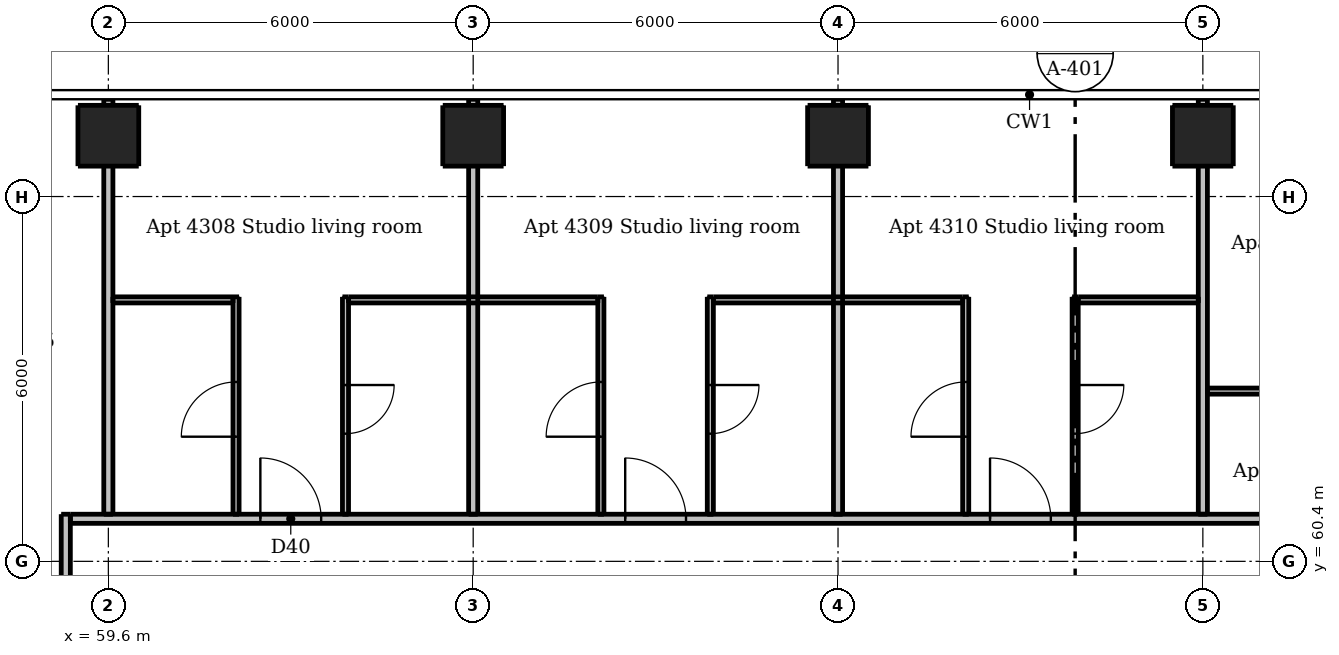
"""IFC4 building model, lengths in metres.
Left out: names, types, materials, properties, quantities, classifications, styles, units other than length and angle.
Written with IfcOpenShell. Run it as: python <this file> out.ifc"""

import sys

from ifc_helpers import new_model, si_unit, direction, frame, frame_2d, origin, origin_2d, place, context, subcontext, project, spatial, rectangle, extrude, element, fill, save


model = new_model("IFC4")
c1 = context("Model", 3, precision=1e-05, world=origin(), true_north=direction((0.0, 1.0)))
c2 = subcontext(c1, "Body", "Model", "MODEL_VIEW")
j1 = project(units=[si_unit("LENGTHUNIT", "METRE"), si_unit("PLANEANGLEUNIT", "RADIAN")], contexts=[c1])
p1 = place(None, origin())
s1 = spatial("IfcSite", under=j1, at=p1, CompositionType="ELEMENT")
p2 = place(p1, origin())
s2 = spatial("IfcBuilding", under=s1, at=p2, CompositionType="ELEMENT")
p3 = place(p2, frame((0.0, 0.0, 161.5)))
s3 = spatial("IfcBuildingStorey", under=s2, at=p3, CompositionType="ELEMENT", Elevation=161.5)
for number, where, z_axis, x_axis in (
    (1, (59.6, 67.4, 0.0), (0.0, 0.0, 1.0), (1.0, 0.0, 0.0)),
    (2, (65.6, 67.4, 0.0), (0.0, 0.0, 1.0), (1.0, 0.0, 0.0)),
    (3, (71.6, 67.4, 0.0), (0.0, 0.0, 1.0), (1.0, 0.0, 0.0)),
    (4, (77.6, 67.4, 0.0), (0.0, 0.0, 1.0), (1.0, 0.0, 0.0)),
):
    element("IfcColumn", number, at=place(p3, frame(where, z_axis=z_axis, x_axis=x_axis)), inside=s3, PredefinedType="COLUMN", context=c2, shape_type="SweptSolid", body=[
        extrude(rectangle(XDim=1.0, YDim=1.0, at=origin_2d()), origin(), (0.0, 0.0, 1.0), 3.05),
    ])
p4 = place(p3, frame((61.7, 61.175, 0.0), z_axis=(0.0, 0.0, 1.0), x_axis=(0.0, 1.0, 0.0)))
e5 = element("IfcWall", 5, at=p4, inside=s3, PredefinedType="PARTITIONING", context=c2, shape_type="SweptSolid", body=[
    extrude(rectangle(XDim=3.575, YDim=0.1, at=frame_2d((1.788, 0.0))), origin(), (0.0, 0.0, 1.0), 3.05),
])
p5 = place(p4, frame((1.275, 0.0, 0.0)))
e6 = element("IfcOpeningElement", 6, at=p5, cuts=e5, PredefinedType="OPENING", context=c2, shape_type="SweptSolid", body=[
    extrude(rectangle(XDim=0.9, YDim=2.1, at=frame_2d((0.45, 1.05))), frame((0.0, 0.06, 0.0), z_axis=(0.0, -1.0, 0.0), x_axis=(1.0, 0.0, 0.0)), (0.0, 0.0, 1.0), 0.12),
])
p6 = place(p3, frame((63.5, 64.75, 0.0), z_axis=(0.0, 0.0, 1.0), x_axis=(0.0, -1.0, 0.0)))
e7 = element("IfcWall", 7, at=p6, inside=s3, PredefinedType="PARTITIONING", context=c2, shape_type="SweptSolid", body=[
    extrude(rectangle(XDim=3.575, YDim=0.1, at=frame_2d((1.788, 0.0))), origin(), (0.0, 0.0, 1.0), 3.05),
])
p7 = place(p6, frame((1.45, 0.0, 0.0)))
e8 = element("IfcOpeningElement", 8, at=p7, cuts=e7, PredefinedType="OPENING", context=c2, shape_type="SweptSolid", body=[
    extrude(rectangle(XDim=0.8, YDim=2.1, at=frame_2d((0.4, 1.05))), frame((0.0, 0.06, 0.0), z_axis=(0.0, -1.0, 0.0), x_axis=(1.0, 0.0, 0.0)), (0.0, 0.0, 1.0), 0.12),
])
p8 = place(p3, frame((67.7, 61.175, 0.0), z_axis=(0.0, 0.0, 1.0), x_axis=(0.0, 1.0, 0.0)))
e9 = element("IfcWall", 9, at=p8, inside=s3, PredefinedType="PARTITIONING", context=c2, shape_type="SweptSolid", body=[
    extrude(rectangle(XDim=3.575, YDim=0.1, at=frame_2d((1.788, 0.0))), origin(), (0.0, 0.0, 1.0), 3.05),
])
p9 = place(p8, frame((1.275, 0.0, 0.0)))
e10 = element("IfcOpeningElement", 10, at=p9, cuts=e9, PredefinedType="OPENING", context=c2, shape_type="SweptSolid", body=[
    extrude(rectangle(XDim=0.9, YDim=2.1, at=frame_2d((0.45, 1.05))), frame((0.0, 0.06, 0.0), z_axis=(0.0, -1.0, 0.0), x_axis=(1.0, 0.0, 0.0)), (0.0, 0.0, 1.0), 0.12),
])
p10 = place(p3, frame((69.5, 64.75, 0.0), z_axis=(0.0, 0.0, 1.0), x_axis=(0.0, -1.0, 0.0)))
e11 = element("IfcWall", 11, at=p10, inside=s3, PredefinedType="PARTITIONING", context=c2, shape_type="SweptSolid", body=[
    extrude(rectangle(XDim=3.575, YDim=0.1, at=frame_2d((1.788, 0.0))), origin(), (0.0, 0.0, 1.0), 3.05),
])
p11 = place(p10, frame((1.45, 0.0, 0.0)))
e12 = element("IfcOpeningElement", 12, at=p11, cuts=e11, PredefinedType="OPENING", context=c2, shape_type="SweptSolid", body=[
    extrude(rectangle(XDim=0.8, YDim=2.1, at=frame_2d((0.4, 1.05))), frame((0.0, 0.06, 0.0), z_axis=(0.0, -1.0, 0.0), x_axis=(1.0, 0.0, 0.0)), (0.0, 0.0, 1.0), 0.12),
])
p12 = place(p3, frame((73.7, 61.175, 0.0), z_axis=(0.0, 0.0, 1.0), x_axis=(0.0, 1.0, 0.0)))
e13 = element("IfcWall", 13, at=p12, inside=s3, PredefinedType="PARTITIONING", context=c2, shape_type="SweptSolid", body=[
    extrude(rectangle(XDim=3.575, YDim=0.1, at=frame_2d((1.788, 0.0))), origin(), (0.0, 0.0, 1.0), 3.05),
])
p13 = place(p12, frame((1.275, 0.0, 0.0)))
e14 = element("IfcOpeningElement", 14, at=p13, cuts=e13, PredefinedType="OPENING", context=c2, shape_type="SweptSolid", body=[
    extrude(rectangle(XDim=0.9, YDim=2.1, at=frame_2d((0.45, 1.05))), frame((0.0, 0.06, 0.0), z_axis=(0.0, -1.0, 0.0), x_axis=(1.0, 0.0, 0.0)), (0.0, 0.0, 1.0), 0.12),
])
p14 = place(p3, frame((75.5, 64.75, 0.0), z_axis=(0.0, 0.0, 1.0), x_axis=(0.0, -1.0, 0.0)))
e15 = element("IfcWall", 15, at=p14, inside=s3, PredefinedType="PARTITIONING", context=c2, shape_type="SweptSolid", body=[
    extrude(rectangle(XDim=3.575, YDim=0.1, at=frame_2d((1.788, 0.0))), origin(), (0.0, 0.0, 1.0), 3.05),
])
p15 = place(p14, frame((1.45, 0.0, 0.0)))
e16 = element("IfcOpeningElement", 16, at=p15, cuts=e15, PredefinedType="OPENING", context=c2, shape_type="SweptSolid", body=[
    extrude(rectangle(XDim=0.8, YDim=2.1, at=frame_2d((0.4, 1.05))), frame((0.0, 0.06, 0.0), z_axis=(0.0, -1.0, 0.0), x_axis=(1.0, 0.0, 0.0)), (0.0, 0.0, 1.0), 0.12),
])
p16 = place(p3, frame((59.675, 64.7, 0.0), z_axis=(0.0, 0.0, 1.0), x_axis=(1.0, 0.0, 0.0)))
e17 = element("IfcWall", 17, at=p16, inside=s3, PredefinedType="PARTITIONING", context=c2, shape_type="SweptSolid", body=[
    extrude(rectangle(XDim=1.975, YDim=0.1, at=frame_2d((0.987, 0.0))), origin(), (0.0, 0.0, 1.0), 3.05),
])
for number, where, z_axis, x_axis in (
    (18, (63.55, 64.7, 0.0), (0.0, 0.0, 1.0), (1.0, 0.0, 0.0)),
    (19, (69.55, 64.7, 0.0), (0.0, 0.0, 1.0), (1.0, 0.0, 0.0)),
):
    element("IfcWall", number, at=place(p3, frame(where, z_axis=z_axis, x_axis=x_axis)), inside=s3, PredefinedType="PARTITIONING", context=c2, shape_type="SweptSolid", body=[
        extrude(rectangle(XDim=4.1, YDim=0.1, at=frame_2d((2.05, 0.0))), origin(), (0.0, 0.0, 1.0), 3.05),
    ])
p17 = place(p3, frame((75.55, 64.7, 0.0), z_axis=(0.0, 0.0, 1.0), x_axis=(1.0, 0.0, 0.0)))
e20 = element("IfcWall", 20, at=p17, inside=s3, PredefinedType="PARTITIONING", context=c2, shape_type="SweptSolid", body=[
    extrude(rectangle(XDim=1.975, YDim=0.1, at=frame_2d((0.987, 0.0))), origin(), (0.0, 0.0, 1.0), 3.05),
])
p18 = place(p3, frame((83.55, 63.2, 0.0), z_axis=(0.0, 0.0, 1.0), x_axis=(-1.0, 0.0, 0.0)))
e21 = element("IfcWall", 21, at=p18, inside=s3, PredefinedType="PARTITIONING", context=c2, shape_type="SweptSolid", body=[
    extrude(rectangle(XDim=5.875, YDim=0.1, at=frame_2d((2.938, 0.0))), origin(), (0.0, 0.0, 1.0), 3.05),
])
p19 = place(p18, frame((3.75, 0.0, 0.0)))
e22 = element("IfcOpeningElement", 22, at=p19, cuts=e21, PredefinedType="OPENING", context=c2, shape_type="SweptSolid", body=[
    extrude(rectangle(XDim=0.8, YDim=2.1, at=frame_2d((0.4, 1.05))), frame((0.0, 0.06, 0.0), z_axis=(0.0, -1.0, 0.0), x_axis=(1.0, 0.0, 0.0)), (0.0, 0.0, 1.0), 0.12),
])
p20 = place(p3, frame((58.9, 30.325, 0.0), z_axis=(0.0, 0.0, 1.0), x_axis=(0.0, 1.0, 0.0)))
e23 = element("IfcWall", 23, at=p20, inside=s3, PredefinedType="PARTITIONING", context=c2, shape_type="SweptSolid", body=[
    extrude(rectangle(XDim=30.85, YDim=0.15, at=frame_2d((15.425, 0.0))), origin(), (0.0, 0.0, 1.0), 3.05),
])
p21 = place(p20, frame((2.575, 0.0, 0.0)))
e24 = element("IfcOpeningElement", 24, at=p21, cuts=e23, PredefinedType="OPENING", context=c2, shape_type="SweptSolid", body=[
    extrude(rectangle(XDim=1.0, YDim=2.1, at=frame_2d((0.5, 1.05))), frame((0.0, 0.085, 0.0), z_axis=(0.0, -1.0, 0.0), x_axis=(1.0, 0.0, 0.0)), (0.0, 0.0, 1.0), 0.17),
])
p22 = place(p20, frame((8.575, 0.0, 0.0)))
e25 = element("IfcOpeningElement", 25, at=p22, cuts=e23, PredefinedType="OPENING", context=c2, shape_type="SweptSolid", body=[
    extrude(rectangle(XDim=1.0, YDim=2.1, at=frame_2d((0.5, 1.05))), frame((0.0, 0.085, 0.0), z_axis=(0.0, -1.0, 0.0), x_axis=(1.0, 0.0, 0.0)), (0.0, 0.0, 1.0), 0.17),
])
p23 = place(p20, frame((14.575, 0.0, 0.0)))
e26 = element("IfcOpeningElement", 26, at=p23, cuts=e23, PredefinedType="OPENING", context=c2, shape_type="SweptSolid", body=[
    extrude(rectangle(XDim=1.0, YDim=2.1, at=frame_2d((0.5, 1.05))), frame((0.0, 0.085, 0.0), z_axis=(0.0, -1.0, 0.0), x_axis=(1.0, 0.0, 0.0)), (0.0, 0.0, 1.0), 0.17),
])
p24 = place(p20, frame((26.925, 0.0, 0.0)))
e27 = element("IfcOpeningElement", 27, at=p24, cuts=e23, PredefinedType="OPENING", context=c2, shape_type="SweptSolid", body=[
    extrude(rectangle(XDim=1.0, YDim=2.1, at=frame_2d((0.5, 1.05))), frame((0.0, 0.085, 0.0), z_axis=(0.0, -1.0, 0.0), x_axis=(1.0, 0.0, 0.0)), (0.0, 0.0, 1.0), 0.17),
])
p25 = place(p3, frame((59.6, 61.175, 0.0), z_axis=(0.0, 0.0, 1.0), x_axis=(0.0, 1.0, 0.0)))
e28 = element("IfcWall", 28, at=p25, inside=s3, PredefinedType="PARTITIONING", context=c2, shape_type="SweptSolid", body=[
    extrude(rectangle(XDim=6.825, YDim=0.15, at=frame_2d((3.413, 0.0))), origin(), (0.0, 0.0, 1.0), 2.51),
])
for number, where, z_axis, x_axis in (
    (29, (65.6, 61.175, 0.0), (0.0, 0.0, 1.0), (0.0, 1.0, 0.0)),
    (30, (71.6, 61.175, 0.0), (0.0, 0.0, 1.0), (0.0, 1.0, 0.0)),
    (31, (77.6, 61.175, 0.0), (0.0, 0.0, 1.0), (0.0, 1.0, 0.0)),
):
    element("IfcWall", number, at=place(p3, frame(where, z_axis=z_axis, x_axis=x_axis)), inside=s3, PredefinedType="PARTITIONING", context=c2, shape_type="SweptSolid", body=[
        extrude(rectangle(XDim=6.825, YDim=0.15, at=frame_2d((3.413, 0.0))), origin(), (0.0, 0.0, 1.0), 2.516),
    ])
p26 = place(p3, frame((58.975, 61.1, 0.0), z_axis=(0.0, 0.0, 1.0), x_axis=(1.0, 0.0, 0.0)))
e32 = element("IfcWall", 32, at=p26, inside=s3, PredefinedType="PARTITIONING", context=c2, shape_type="SweptSolid", body=[
    extrude(rectangle(XDim=29.25, YDim=0.15, at=frame_2d((14.625, 0.0))), origin(), (0.0, 0.0, 1.0), 3.05),
])
p27 = place(p26, frame((3.125, 0.0, 0.0)))
e33 = element("IfcOpeningElement", 33, at=p27, cuts=e32, PredefinedType="OPENING", context=c2, shape_type="SweptSolid", body=[
    extrude(rectangle(XDim=1.0, YDim=2.1, at=frame_2d((0.5, 1.05))), frame((0.0, 0.085, 0.0), z_axis=(0.0, -1.0, 0.0), x_axis=(1.0, 0.0, 0.0)), (0.0, 0.0, 1.0), 0.17),
])
p28 = place(p26, frame((9.125, 0.0, 0.0)))
e34 = element("IfcOpeningElement", 34, at=p28, cuts=e32, PredefinedType="OPENING", context=c2, shape_type="SweptSolid", body=[
    extrude(rectangle(XDim=1.0, YDim=2.1, at=frame_2d((0.5, 1.05))), frame((0.0, 0.085, 0.0), z_axis=(0.0, -1.0, 0.0), x_axis=(1.0, 0.0, 0.0)), (0.0, 0.0, 1.0), 0.17),
])
p29 = place(p26, frame((15.125, 0.0, 0.0)))
e35 = element("IfcOpeningElement", 35, at=p29, cuts=e32, PredefinedType="OPENING", context=c2, shape_type="SweptSolid", body=[
    extrude(rectangle(XDim=1.0, YDim=2.1, at=frame_2d((0.5, 1.05))), frame((0.0, 0.085, 0.0), z_axis=(0.0, -1.0, 0.0), x_axis=(1.0, 0.0, 0.0)), (0.0, 0.0, 1.0), 0.17),
])
p30 = place(p26, frame((26.475, 0.0, 0.0)))
e36 = element("IfcOpeningElement", 36, at=p30, cuts=e32, PredefinedType="OPENING", context=c2, shape_type="SweptSolid", body=[
    extrude(rectangle(XDim=1.0, YDim=2.1, at=frame_2d((0.5, 1.05))), frame((0.0, 0.085, 0.0), z_axis=(0.0, -1.0, 0.0), x_axis=(1.0, 0.0, 0.0)), (0.0, 0.0, 1.0), 0.17),
])
p31 = place(p27, origin())
e37 = element("IfcDoor", 37, at=p31, inside=s3, OperationType="SINGLE_SWING_LEFT", PredefinedType="DOOR", context=c2, shape_type="SweptSolid", body=[
    extrude(rectangle(XDim=1.0, YDim=2.1, at=frame_2d((0.5, 1.05))), frame((0.0, 0.025, 0.0), z_axis=(0.0, -1.0, 0.0), x_axis=(1.0, 0.0, 0.0)), (0.0, 0.0, 1.0), 0.05),
])
fill(e33, e37)
p32 = place(p5, origin())
e38 = element("IfcDoor", 38, at=p32, inside=s3, OperationType="SINGLE_SWING_LEFT", PredefinedType="DOOR", context=c2, shape_type="SweptSolid", body=[
    extrude(rectangle(XDim=0.9, YDim=2.1, at=frame_2d((0.45, 1.05))), frame((0.0, 0.025, 0.0), z_axis=(0.0, -1.0, 0.0), x_axis=(1.0, 0.0, 0.0)), (0.0, 0.0, 1.0), 0.05),
])
fill(e6, e38)
p33 = place(p7, origin())
e39 = element("IfcDoor", 39, at=p33, inside=s3, OperationType="SINGLE_SWING_LEFT", PredefinedType="DOOR", context=c2, shape_type="SweptSolid", body=[
    extrude(rectangle(XDim=0.8, YDim=2.1, at=frame_2d((0.4, 1.05))), frame((0.0, 0.025, 0.0), z_axis=(0.0, -1.0, 0.0), x_axis=(1.0, 0.0, 0.0)), (0.0, 0.0, 1.0), 0.05),
])
fill(e8, e39)
p34 = place(p28, origin())
e40 = element("IfcDoor", 40, at=p34, inside=s3, OperationType="SINGLE_SWING_LEFT", PredefinedType="DOOR", context=c2, shape_type="SweptSolid", body=[
    extrude(rectangle(XDim=1.0, YDim=2.1, at=frame_2d((0.5, 1.05))), frame((0.0, 0.025, 0.0), z_axis=(0.0, -1.0, 0.0), x_axis=(1.0, 0.0, 0.0)), (0.0, 0.0, 1.0), 0.05),
])
fill(e34, e40)
p35 = place(p9, origin())
e41 = element("IfcDoor", 41, at=p35, inside=s3, OperationType="SINGLE_SWING_LEFT", PredefinedType="DOOR", context=c2, shape_type="SweptSolid", body=[
    extrude(rectangle(XDim=0.9, YDim=2.1, at=frame_2d((0.45, 1.05))), frame((0.0, 0.025, 0.0), z_axis=(0.0, -1.0, 0.0), x_axis=(1.0, 0.0, 0.0)), (0.0, 0.0, 1.0), 0.05),
])
fill(e10, e41)
p36 = place(p11, origin())
e42 = element("IfcDoor", 42, at=p36, inside=s3, OperationType="SINGLE_SWING_LEFT", PredefinedType="DOOR", context=c2, shape_type="SweptSolid", body=[
    extrude(rectangle(XDim=0.8, YDim=2.1, at=frame_2d((0.4, 1.05))), frame((0.0, 0.025, 0.0), z_axis=(0.0, -1.0, 0.0), x_axis=(1.0, 0.0, 0.0)), (0.0, 0.0, 1.0), 0.05),
])
fill(e12, e42)
p37 = place(p29, origin())
e43 = element("IfcDoor", 43, at=p37, inside=s3, OperationType="SINGLE_SWING_LEFT", PredefinedType="DOOR", context=c2, shape_type="SweptSolid", body=[
    extrude(rectangle(XDim=1.0, YDim=2.1, at=frame_2d((0.5, 1.05))), frame((0.0, 0.025, 0.0), z_axis=(0.0, -1.0, 0.0), x_axis=(1.0, 0.0, 0.0)), (0.0, 0.0, 1.0), 0.05),
])
fill(e35, e43)
p38 = place(p13, origin())
e44 = element("IfcDoor", 44, at=p38, inside=s3, OperationType="SINGLE_SWING_LEFT", PredefinedType="DOOR", context=c2, shape_type="SweptSolid", body=[
    extrude(rectangle(XDim=0.9, YDim=2.1, at=frame_2d((0.45, 1.05))), frame((0.0, 0.025, 0.0), z_axis=(0.0, -1.0, 0.0), x_axis=(1.0, 0.0, 0.0)), (0.0, 0.0, 1.0), 0.05),
])
fill(e14, e44)
p39 = place(p15, origin())
e45 = element("IfcDoor", 45, at=p39, inside=s3, OperationType="SINGLE_SWING_LEFT", PredefinedType="DOOR", context=c2, shape_type="SweptSolid", body=[
    extrude(rectangle(XDim=0.8, YDim=2.1, at=frame_2d((0.4, 1.05))), frame((0.0, 0.025, 0.0), z_axis=(0.0, -1.0, 0.0), x_axis=(1.0, 0.0, 0.0)), (0.0, 0.0, 1.0), 0.05),
])
fill(e16, e45)
save(model, sys.argv[1])
